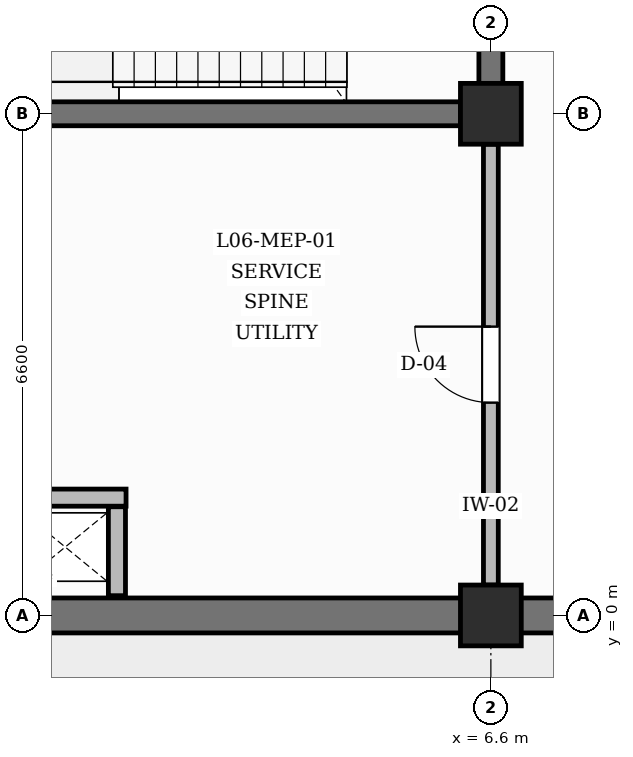
"""IFC4 building model, lengths in metres.
Left out: names, types, materials, properties, quantities, classifications, styles, units other than length and angle.
Written with IfcOpenShell. Run it as: python <this file> out.ifc"""

import sys

from ifc_helpers import new_model, si_unit, direction, frame, frame_2d, origin, origin_2d, place, context, subcontext, project, spatial, rectangle, extrude, element, fill, save


model = new_model("IFC4")
c1 = context("Model", 3, precision=1e-05, world=origin(), true_north=direction((0.0, 1.0)))
c2 = subcontext(c1, "Body", "Model", "MODEL_VIEW")
j1 = project(units=[si_unit("LENGTHUNIT", "METRE"), si_unit("PLANEANGLEUNIT", "RADIAN")], contexts=[c1])
p1 = place(None, origin())
s1 = spatial("IfcSite", under=j1, at=p1, CompositionType="ELEMENT")
p2 = place(p1, origin())
s2 = spatial("IfcBuilding", under=s1, at=p2, CompositionType="ELEMENT")
p3 = place(p2, frame((0.0, 0.0, 27.0)))
s3 = spatial("IfcBuildingStorey", under=s2, at=p3, CompositionType="ELEMENT", Elevation=27.0)
for number, where, z_axis, x_axis in (
    (1, (6.6, 0.0, 0.0), (0.0, 0.0, 1.0), (1.0, 0.0, 0.0)),
    (2, (6.6, 6.6, 0.0), (0.0, 0.0, 1.0), (1.0, 0.0, 0.0)),
):
    element("IfcColumn", number, at=place(p3, frame(where, z_axis=z_axis, x_axis=x_axis)), inside=s3, PredefinedType="COLUMN", context=c2, shape_type="SweptSolid", body=[
        extrude(rectangle(XDim=0.8, YDim=0.8, at=origin_2d()), origin(), (0.0, 0.0, 1.0), 4.2),
    ])
for number, where, z_axis, x_axis in (
    (3, (0.4, 0.0, 0.0), (0.0, 0.0, 1.0), (1.0, 0.0, 0.0)),
    (4, (7.0, 0.0, 0.0), (0.0, 0.0, 1.0), (1.0, 0.0, 0.0)),
):
    element("IfcWall", number, at=place(p3, frame(where, z_axis=z_axis, x_axis=x_axis)), inside=s3, PredefinedType="SOLIDWALL", context=c2, shape_type="SweptSolid", body=[
        extrude(rectangle(XDim=5.8, YDim=0.46, at=frame_2d((2.9, 0.0))), origin(), (0.0, 0.0, 1.0), 3.27),
    ])
p4 = place(p3, frame((0.4, 6.6, 0.0), z_axis=(0.0, 0.0, 1.0), x_axis=(1.0, 0.0, 0.0)))
e5 = element("IfcWall", 5, at=p4, inside=s3, PredefinedType="SHEAR", context=c2, shape_type="SweptSolid", body=[
    extrude(rectangle(XDim=5.8, YDim=0.315, at=frame_2d((2.9, 0.0))), origin(), (0.0, 0.0, 1.0), 3.17),
])
p5 = place(p3, frame((6.6, 7.0, 0.0), z_axis=(0.0, 0.0, 1.0), x_axis=(0.0, 1.0, 0.0)))
e6 = element("IfcWall", 6, at=p5, inside=s3, PredefinedType="SHEAR", context=c2, shape_type="SweptSolid", body=[
    extrude(rectangle(XDim=5.8, YDim=0.315, at=frame_2d((2.9, 0.0))), origin(), (0.0, 0.0, 1.0), 3.17),
])
p6 = place(p5, frame((2.325, 0.0, 0.0)))
e7 = element("IfcOpeningElement", 7, at=p6, cuts=e6, PredefinedType="OPENING", context=c2, shape_type="SweptSolid", body=[
    extrude(rectangle(XDim=1.15, YDim=2.2, at=frame_2d((0.575, 1.1))), frame((0.0, 0.167, 0.0), z_axis=(0.0, -1.0, 0.0), x_axis=(1.0, 0.0, 0.0)), (0.0, 0.0, 1.0), 0.335),
])
p7 = place(p3, frame((1.68, 0.26, 0.0), z_axis=(0.0, 0.0, 1.0), x_axis=(0.0, 1.0, 0.0)))
e8 = element("IfcWall", 8, at=p7, inside=s3, PredefinedType="PARTITIONING", context=c2, shape_type="SweptSolid", body=[
    extrude(rectangle(XDim=1.17, YDim=0.225, at=frame_2d((0.585, 0.0))), origin(), (0.0, 0.0, 1.0), 3.87),
])
p8 = place(p3, frame((0.26, 1.55, 0.0), z_axis=(0.0, 0.0, 1.0), x_axis=(1.0, 0.0, 0.0)))
e9 = element("IfcWall", 9, at=p8, inside=s3, PredefinedType="PARTITIONING", context=c2, shape_type="SweptSolid", body=[
    extrude(rectangle(XDim=1.54, YDim=0.225, at=frame_2d((0.77, 0.0))), origin(), (0.0, 0.0, 1.0), 3.87),
])
p9 = place(p3, frame((6.6, 0.4, 0.0), z_axis=(0.0, 0.0, 1.0), x_axis=(0.0, 1.0, 0.0)))
e10 = element("IfcWall", 10, at=p9, inside=s3, PredefinedType="PARTITIONING", context=c2, shape_type="SweptSolid", body=[
    extrude(rectangle(XDim=5.8, YDim=0.195, at=frame_2d((2.9, 0.0))), origin(), (0.0, 0.0, 1.0), 3.17),
])
p10 = place(p9, frame((2.4, 0.0, 0.0)))
e11 = element("IfcOpeningElement", 11, at=p10, cuts=e10, PredefinedType="OPENING", context=c2, shape_type="SweptSolid", body=[
    extrude(rectangle(XDim=1.0, YDim=2.1, at=frame_2d((0.5, 1.05))), frame((0.0, 0.107, 0.0), z_axis=(0.0, -1.0, 0.0), x_axis=(1.0, 0.0, 0.0)), (0.0, 0.0, 1.0), 0.215),
])
p11 = place(p10, origin())
e12 = element("IfcDoor", 12, at=p11, inside=s3, OperationType="SINGLE_SWING_RIGHT", PredefinedType="DOOR", context=c2, shape_type="SweptSolid", body=[
    extrude(rectangle(XDim=1.0, YDim=2.1, at=frame_2d((0.5, 1.05))), frame((0.0, 0.025, 0.0), z_axis=(0.0, -1.0, 0.0), x_axis=(1.0, 0.0, 0.0)), (0.0, 0.0, 1.0), 0.05),
])
fill(e11, e12)
save(model, sys.argv[1])
